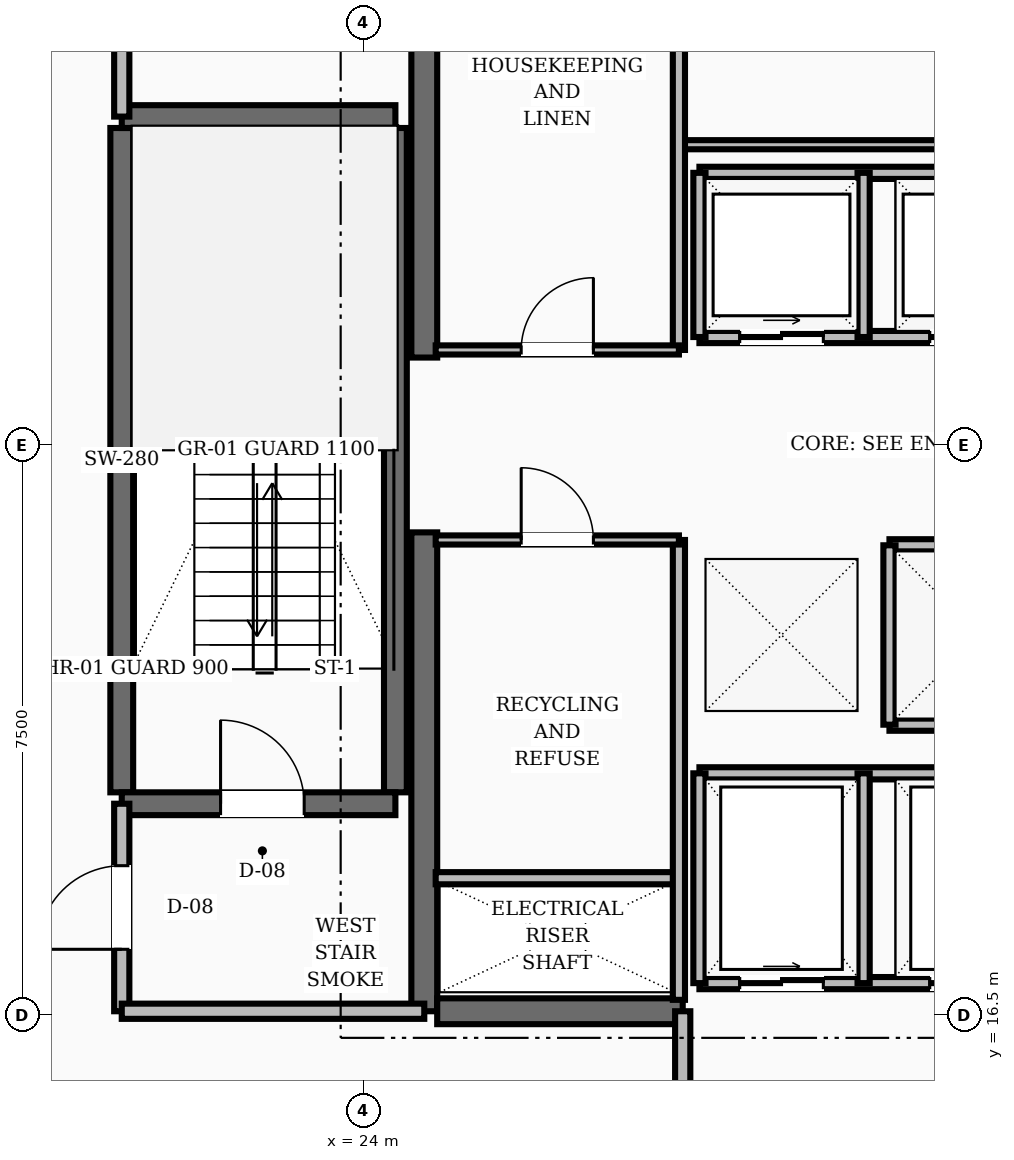
"""IFC4 building model, lengths in metres.
Left out: names, types, materials, properties, quantities, classifications, styles, units other than length and angle.
Written with IfcOpenShell. Run it as: python <this file> out.ifc"""

import sys

from ifc_helpers import new_model, si_unit, direction, frame, frame_2d, origin, place, context, subcontext, project, spatial, rectangle, extrude, element, fill, save


model = new_model("IFC4")
c1 = context("Model", 3, precision=1e-05, world=origin(), true_north=direction((0.0, 1.0)))
c2 = subcontext(c1, "Body", "Model", "MODEL_VIEW")
j1 = project(units=[si_unit("LENGTHUNIT", "METRE"), si_unit("PLANEANGLEUNIT", "RADIAN")], contexts=[c1])
p1 = place(None, origin())
s1 = spatial("IfcSite", under=j1, at=p1, CompositionType="ELEMENT")
p2 = place(p1, origin())
s2 = spatial("IfcBuilding", under=s1, at=p2, CompositionType="ELEMENT")
p3 = place(p2, frame((0.0, 0.0, 167.6)))
s3 = spatial("IfcBuildingStorey", under=s2, at=p3, CompositionType="ELEMENT", Elevation=167.6)
for number, where, z_axis, x_axis in (
    (1, (24.8, 16.55, 0.0), (0.0, 0.0, 1.0), (0.0, 1.0, 0.0)),
    (2, (24.8, 25.15, 0.0), (0.0, 0.0, 1.0), (0.0, 1.0, 0.0)),
):
    element("IfcWall", number, at=place(p3, frame(where, z_axis=z_axis, x_axis=x_axis)), inside=s3, PredefinedType="SHEAR", context=c2, shape_type="SweptSolid", body=[
        extrude(rectangle(XDim=6.3, YDim=0.34, at=frame_2d((3.15, 0.0))), origin(), (0.0, 0.0, 1.0), 3.6),
    ])
p4 = place(p3, frame((24.97, 16.55, 0.0), z_axis=(0.0, 0.0, 1.0), x_axis=(1.0, 0.0, 0.0)))
e3 = element("IfcWall", 3, at=p4, inside=s3, PredefinedType="SHEAR", context=c2, shape_type="SweptSolid", body=[
    extrude(rectangle(XDim=3.23, YDim=0.34, at=frame_2d((1.615, 0.0))), origin(), (0.0, 0.0, 1.0), 3.6),
])
for number, where, z_axis, x_axis in (
    (4, (20.82, 19.43, 0.0), (0.0, 0.0, 1.0), (0.0, 1.0, 0.0)),
    (5, (24.42, 19.43, 0.0), (0.0, 0.0, 1.0), (0.0, 1.0, 0.0)),
):
    element("IfcWall", number, at=place(p3, frame(where, z_axis=z_axis, x_axis=x_axis)), inside=s3, PredefinedType="SHEAR", context=c2, shape_type="SweptSolid", body=[
        extrude(rectangle(XDim=8.74, YDim=0.3, at=frame_2d((4.37, 0.0))), origin(), (0.0, 0.0, 1.0), 3.6),
    ])
p5 = place(p3, frame((20.82, 19.28, 0.0), z_axis=(0.0, 0.0, 1.0), x_axis=(1.0, 0.0, 0.0)))
e6 = element("IfcWall", 6, at=p5, inside=s3, PredefinedType="SHEAR", context=c2, shape_type="SweptSolid", body=[
    extrude(rectangle(XDim=3.6, YDim=0.3, at=frame_2d((1.8, 0.0))), origin(), (0.0, 0.0, 1.0), 3.6),
])
p6 = place(p5, frame((1.3, 0.0, 0.0)))
e7 = element("IfcOpeningElement", 7, at=p6, cuts=e6, PredefinedType="OPENING", context=c2, shape_type="SweptSolid", body=[
    extrude(rectangle(XDim=1.1, YDim=2.1, at=frame_2d((0.55, 1.05))), frame((0.0, 0.16, 0.0), z_axis=(0.0, -1.0, 0.0), x_axis=(1.0, 0.0, 0.0)), (0.0, 0.0, 1.0), 0.32),
])
p7 = place(p3, frame((20.82, 28.32, 0.0), z_axis=(0.0, 0.0, 1.0), x_axis=(1.0, 0.0, 0.0)))
e8 = element("IfcWall", 8, at=p7, inside=s3, PredefinedType="SHEAR", context=c2, shape_type="SweptSolid", body=[
    extrude(rectangle(XDim=3.6, YDim=0.3, at=frame_2d((1.8, 0.0))), origin(), (0.0, 0.0, 1.0), 3.6),
])
p8 = place(p3, frame((20.82, 16.55, 0.0), z_axis=(0.0, 0.0, 1.0), x_axis=(0.0, 1.0, 0.0)))
e9 = element("IfcWall", 9, at=p8, inside=s3, PredefinedType="SOLIDWALL", context=c2, shape_type="SweptSolid", body=[
    extrude(rectangle(XDim=2.73, YDim=0.2, at=frame_2d((1.365, 0.0))), origin(), (0.0, 0.0, 1.0), 2.8),
])
p9 = place(p8, frame((0.815, 0.0, 0.0)))
e10 = element("IfcOpeningElement", 10, at=p9, cuts=e9, PredefinedType="OPENING", context=c2, shape_type="SweptSolid", body=[
    extrude(rectangle(XDim=1.1, YDim=2.1, at=frame_2d((0.55, 1.05))), frame((0.0, 0.11, 0.0), z_axis=(0.0, -1.0, 0.0), x_axis=(1.0, 0.0, 0.0)), (0.0, 0.0, 1.0), 0.22),
])
p10 = place(p3, frame((20.82, 16.55, 0.0), z_axis=(0.0, 0.0, 1.0), x_axis=(1.0, 0.0, 0.0)))
e11 = element("IfcWall", 11, at=p10, inside=s3, PredefinedType="SOLIDWALL", context=c2, shape_type="SweptSolid", body=[
    extrude(rectangle(XDim=3.98, YDim=0.2, at=frame_2d((1.99, 0.0))), origin(), (0.0, 0.0, 1.0), 2.8),
])
p11 = place(p3, frame((20.82, 28.32, 0.0), z_axis=(0.0, 0.0, 1.0), x_axis=(0.0, 1.0, 0.0)))
e12 = element("IfcWall", 12, at=p11, inside=s3, PredefinedType="SOLIDWALL", context=c2, shape_type="SweptSolid", body=[
    extrude(rectangle(XDim=3.13, YDim=0.2, at=frame_2d((1.565, 0.0))), origin(), (0.0, 0.0, 1.0), 2.8),
])
p12 = place(p11, frame((1.09, 0.0, 0.0)))
e13 = element("IfcOpeningElement", 13, at=p12, cuts=e12, PredefinedType="OPENING", context=c2, shape_type="SweptSolid", body=[
    extrude(rectangle(XDim=0.95, YDim=2.1, at=frame_2d((0.475, 1.05))), frame((0.0, 0.11, 0.0), z_axis=(0.0, -1.0, 0.0), x_axis=(1.0, 0.0, 0.0)), (0.0, 0.0, 1.0), 0.22),
])
p13 = place(p3, frame((28.2, 14.35, 0.0), z_axis=(0.0, 0.0, 1.0), x_axis=(0.0, 1.0, 0.0)))
e14 = element("IfcWall", 14, at=p13, inside=s3, PredefinedType="SOLIDWALL", context=c2, shape_type="SweptSolid", body=[
    extrude(rectangle(XDim=2.2, YDim=0.2, at=frame_2d((1.1, 0.0))), origin(), (0.0, 0.0, 1.0), 2.8),
])
p14 = place(p3, frame((28.42, 25.42, 0.0), z_axis=(0.0, 0.0, 1.0), x_axis=(1.0, 0.0, 0.0)))
e15 = element("IfcWall", 15, at=p14, inside=s3, PredefinedType="SOLIDWALL", context=c2, shape_type="SweptSolid", body=[
    extrude(rectangle(XDim=4.66, YDim=0.16, at=frame_2d((2.33, 0.0))), origin(), (0.0, 0.0, 1.0), 2.8),
])
p15 = place(p14, frame((0.53, 0.0, 0.0)))
e16 = element("IfcOpeningElement", 16, at=p15, cuts=e15, PredefinedType="OPENING", context=c2, shape_type="SweptSolid", body=[
    extrude(rectangle(XDim=1.1, YDim=2.15, at=frame_2d((0.55, 1.075))), frame((0.0, 0.09, 0.0), z_axis=(0.0, -1.0, 0.0), x_axis=(1.0, 0.0, 0.0)), (0.0, 0.0, 1.0), 0.18),
])
p16 = place(p14, frame((3.03, 0.0, 0.0)))
e17 = element("IfcOpeningElement", 17, at=p16, cuts=e15, PredefinedType="OPENING", context=c2, shape_type="SweptSolid", body=[
    extrude(rectangle(XDim=1.1, YDim=2.15, at=frame_2d((0.55, 1.075))), frame((0.0, 0.09, 0.0), z_axis=(0.0, -1.0, 0.0), x_axis=(1.0, 0.0, 0.0)), (0.0, 0.0, 1.0), 0.18),
])
p17 = place(p3, frame((28.42, 27.58, 0.0), z_axis=(0.0, 0.0, 1.0), x_axis=(1.0, 0.0, 0.0)))
e18 = element("IfcWall", 18, at=p17, inside=s3, PredefinedType="SOLIDWALL", context=c2, shape_type="SweptSolid", body=[
    extrude(rectangle(XDim=4.66, YDim=0.16, at=frame_2d((2.33, 0.0))), origin(), (0.0, 0.0, 1.0), 2.8),
])
for number, where, z_axis, x_axis in (
    (19, (28.42, 25.42, 0.0), (0.0, 0.0, 1.0), (0.0, 1.0, 0.0)),
    (20, (30.58, 25.42, 0.0), (0.0, 0.0, 1.0), (0.0, 1.0, 0.0)),
):
    element("IfcWall", number, at=place(p3, frame(where, z_axis=z_axis, x_axis=x_axis)), inside=s3, PredefinedType="SOLIDWALL", context=c2, shape_type="SweptSolid", body=[
        extrude(rectangle(XDim=2.16, YDim=0.16, at=frame_2d((1.08, 0.0))), origin(), (0.0, 0.0, 1.0), 2.8),
    ])
for number, where, z_axis, x_axis in (
    (21, (30.92, 22.68, 0.0), (0.0, 0.0, 1.0), (1.0, 0.0, 0.0)),
    (22, (30.92, 20.32, 0.0), (0.0, 0.0, 1.0), (1.0, 0.0, 0.0)),
):
    element("IfcWall", number, at=place(p3, frame(where, z_axis=z_axis, x_axis=x_axis)), inside=s3, PredefinedType="SOLIDWALL", context=c2, shape_type="SweptSolid", body=[
        extrude(rectangle(XDim=4.76, YDim=0.16, at=frame_2d((2.38, 0.0))), origin(), (0.0, 0.0, 1.0), 2.8),
    ])
p18 = place(p3, frame((30.92, 20.32, 0.0), z_axis=(0.0, 0.0, 1.0), x_axis=(0.0, 1.0, 0.0)))
e23 = element("IfcWall", 23, at=p18, inside=s3, PredefinedType="SOLIDWALL", context=c2, shape_type="SweptSolid", body=[
    extrude(rectangle(XDim=2.36, YDim=0.16, at=frame_2d((1.18, 0.0))), origin(), (0.0, 0.0, 1.0), 2.8),
])
p19 = place(p3, frame((28.42, 16.92, 0.0), z_axis=(0.0, 0.0, 1.0), x_axis=(1.0, 0.0, 0.0)))
e24 = element("IfcWall", 24, at=p19, inside=s3, PredefinedType="SOLIDWALL", context=c2, shape_type="SweptSolid", body=[
    extrude(rectangle(XDim=7.16, YDim=0.16, at=frame_2d((3.58, 0.0))), origin(), (0.0, 0.0, 1.0), 2.8),
])
p20 = place(p19, frame((0.53, 0.0, 0.0)))
e25 = element("IfcOpeningElement", 25, at=p20, cuts=e24, PredefinedType="OPENING", context=c2, shape_type="SweptSolid", body=[
    extrude(rectangle(XDim=1.1, YDim=2.15, at=frame_2d((0.55, 1.075))), frame((0.0, 0.09, 0.0), z_axis=(0.0, -1.0, 0.0), x_axis=(1.0, 0.0, 0.0)), (0.0, 0.0, 1.0), 0.18),
])
p21 = place(p19, frame((3.03, 0.0, 0.0)))
e26 = element("IfcOpeningElement", 26, at=p21, cuts=e24, PredefinedType="OPENING", context=c2, shape_type="SweptSolid", body=[
    extrude(rectangle(XDim=1.1, YDim=2.15, at=frame_2d((0.55, 1.075))), frame((0.0, 0.09, 0.0), z_axis=(0.0, -1.0, 0.0), x_axis=(1.0, 0.0, 0.0)), (0.0, 0.0, 1.0), 0.18),
])
p22 = place(p19, frame((5.53, 0.0, 0.0)))
e27 = element("IfcOpeningElement", 27, at=p22, cuts=e24, PredefinedType="OPENING", context=c2, shape_type="SweptSolid", body=[
    extrude(rectangle(XDim=1.1, YDim=2.15, at=frame_2d((0.55, 1.075))), frame((0.0, 0.09, 0.0), z_axis=(0.0, -1.0, 0.0), x_axis=(1.0, 0.0, 0.0)), (0.0, 0.0, 1.0), 0.18),
])
p23 = place(p3, frame((28.42, 19.68, 0.0), z_axis=(0.0, 0.0, 1.0), x_axis=(1.0, 0.0, 0.0)))
e28 = element("IfcWall", 28, at=p23, inside=s3, PredefinedType="SOLIDWALL", context=c2, shape_type="SweptSolid", body=[
    extrude(rectangle(XDim=7.16, YDim=0.16, at=frame_2d((3.58, 0.0))), origin(), (0.0, 0.0, 1.0), 2.8),
])
for number, where, z_axis, x_axis in (
    (29, (28.42, 16.92, 0.0), (0.0, 0.0, 1.0), (0.0, 1.0, 0.0)),
    (30, (30.58, 16.92, 0.0), (0.0, 0.0, 1.0), (0.0, 1.0, 0.0)),
):
    element("IfcWall", number, at=place(p3, frame(where, z_axis=z_axis, x_axis=x_axis)), inside=s3, PredefinedType="SOLIDWALL", context=c2, shape_type="SweptSolid", body=[
        extrude(rectangle(XDim=2.76, YDim=0.16, at=frame_2d((1.38, 0.0))), origin(), (0.0, 0.0, 1.0), 2.8),
    ])
p24 = place(p3, frame((28.2, 27.95, 0.0), z_axis=(0.0, 0.0, 1.0), x_axis=(1.0, 0.0, 0.0)))
e31 = element("IfcWall", 31, at=p24, inside=s3, PredefinedType="PARTITIONING", context=c2, shape_type="SweptSolid", body=[
    extrude(rectangle(XDim=7.6, YDim=0.12, at=frame_2d((3.8, 0.0))), origin(), (0.0, 0.0, 1.0), 2.8),
])
p25 = place(p3, frame((24.95, 18.3, 0.0), z_axis=(0.0, 0.0, 1.0), x_axis=(1.0, 0.0, 0.0)))
e32 = element("IfcWall", 32, at=p25, inside=s3, PredefinedType="SOLIDWALL", context=c2, shape_type="SweptSolid", body=[
    extrude(rectangle(XDim=3.2, YDim=0.16, at=frame_2d((1.6, 0.0))), origin(), (0.0, 0.0, 1.0), 2.8),
])
p26 = place(p3, frame((28.15, 16.7, 0.0), z_axis=(0.0, 0.0, 1.0), x_axis=(0.0, 1.0, 0.0)))
e33 = element("IfcWall", 33, at=p26, inside=s3, PredefinedType="SOLIDWALL", context=c2, shape_type="SweptSolid", body=[
    extrude(rectangle(XDim=6.05, YDim=0.16, at=frame_2d((3.025, 0.0))), origin(), (0.0, 0.0, 1.0), 2.8),
])
p27 = place(p3, frame((28.15, 25.25, 0.0), z_axis=(0.0, 0.0, 1.0), x_axis=(0.0, 1.0, 0.0)))
e34 = element("IfcWall", 34, at=p27, inside=s3, PredefinedType="SOLIDWALL", context=c2, shape_type="SweptSolid", body=[
    extrude(rectangle(XDim=6.1, YDim=0.16, at=frame_2d((3.05, 0.0))), origin(), (0.0, 0.0, 1.0), 2.8),
])
p28 = place(p3, frame((24.95, 25.25, 0.0), z_axis=(0.0, 0.0, 1.0), x_axis=(1.0, 0.0, 0.0)))
e35 = element("IfcWall", 35, at=p28, inside=s3, PredefinedType="PARTITIONING", context=c2, shape_type="SweptSolid", body=[
    extrude(rectangle(XDim=3.2, YDim=0.12, at=frame_2d((1.6, 0.0))), origin(), (0.0, 0.0, 1.0), 2.8),
])
p29 = place(p28, frame((1.125, 0.0, 0.0)))
e36 = element("IfcOpeningElement", 36, at=p29, cuts=e35, PredefinedType="OPENING", context=c2, shape_type="SweptSolid", body=[
    extrude(rectangle(XDim=0.95, YDim=2.1, at=frame_2d((0.475, 1.05))), frame((0.0, 0.07, 0.0), z_axis=(0.0, -1.0, 0.0), x_axis=(1.0, 0.0, 0.0)), (0.0, 0.0, 1.0), 0.14),
])
p30 = place(p3, frame((24.95, 22.75, 0.0), z_axis=(0.0, 0.0, 1.0), x_axis=(1.0, 0.0, 0.0)))
e37 = element("IfcWall", 37, at=p30, inside=s3, PredefinedType="PARTITIONING", context=c2, shape_type="SweptSolid", body=[
    extrude(rectangle(XDim=3.2, YDim=0.12, at=frame_2d((1.6, 0.0))), origin(), (0.0, 0.0, 1.0), 2.8),
])
p31 = place(p30, frame((1.125, 0.0, 0.0)))
e38 = element("IfcOpeningElement", 38, at=p31, cuts=e37, PredefinedType="OPENING", context=c2, shape_type="SweptSolid", body=[
    extrude(rectangle(XDim=0.95, YDim=2.1, at=frame_2d((0.475, 1.05))), frame((0.0, 0.07, 0.0), z_axis=(0.0, -1.0, 0.0), x_axis=(1.0, 0.0, 0.0)), (0.0, 0.0, 1.0), 0.14),
])
p32 = place(p6, origin())
e39 = element("IfcDoor", 39, at=p32, inside=s3, OperationType="SINGLE_SWING_LEFT", PredefinedType="DOOR", context=c2, shape_type="SweptSolid", body=[
    extrude(rectangle(XDim=1.1, YDim=2.1, at=frame_2d((0.55, 1.05))), frame((0.0, 0.025, 0.0), z_axis=(0.0, -1.0, 0.0), x_axis=(1.0, 0.0, 0.0)), (0.0, 0.0, 1.0), 0.05),
])
fill(e7, e39)
p33 = place(p9, origin())
e40 = element("IfcDoor", 40, at=p33, inside=s3, OperationType="SINGLE_SWING_LEFT", PredefinedType="DOOR", context=c2, shape_type="SweptSolid", body=[
    extrude(rectangle(XDim=1.1, YDim=2.1, at=frame_2d((0.55, 1.05))), frame((0.0, 0.025, 0.0), z_axis=(0.0, -1.0, 0.0), x_axis=(1.0, 0.0, 0.0)), (0.0, 0.0, 1.0), 0.05),
])
fill(e10, e40)
p34 = place(p15, origin())
e41 = element("IfcDoor", 41, at=p34, inside=s3, OperationType="SLIDING_TO_RIGHT", PredefinedType="DOOR", context=c2, shape_type="SweptSolid", body=[
    extrude(rectangle(XDim=1.1, YDim=2.15, at=frame_2d((0.55, 1.075))), frame((0.0, 0.025, 0.0), z_axis=(0.0, -1.0, 0.0), x_axis=(1.0, 0.0, 0.0)), (0.0, 0.0, 1.0), 0.05),
])
fill(e16, e41)
p35 = place(p16, origin())
e42 = element("IfcDoor", 42, at=p35, inside=s3, OperationType="SLIDING_TO_RIGHT", PredefinedType="DOOR", context=c2, shape_type="SweptSolid", body=[
    extrude(rectangle(XDim=1.1, YDim=2.15, at=frame_2d((0.55, 1.075))), frame((0.0, 0.025, 0.0), z_axis=(0.0, -1.0, 0.0), x_axis=(1.0, 0.0, 0.0)), (0.0, 0.0, 1.0), 0.05),
])
fill(e17, e42)
p36 = place(p20, origin())
e43 = element("IfcDoor", 43, at=p36, inside=s3, OperationType="SLIDING_TO_RIGHT", PredefinedType="DOOR", context=c2, shape_type="SweptSolid", body=[
    extrude(rectangle(XDim=1.1, YDim=2.15, at=frame_2d((0.55, 1.075))), frame((0.0, 0.025, 0.0), z_axis=(0.0, -1.0, 0.0), x_axis=(1.0, 0.0, 0.0)), (0.0, 0.0, 1.0), 0.05),
])
fill(e25, e43)
p37 = place(p21, origin())
e44 = element("IfcDoor", 44, at=p37, inside=s3, OperationType="SLIDING_TO_RIGHT", PredefinedType="DOOR", context=c2, shape_type="SweptSolid", body=[
    extrude(rectangle(XDim=1.1, YDim=2.15, at=frame_2d((0.55, 1.075))), frame((0.0, 0.025, 0.0), z_axis=(0.0, -1.0, 0.0), x_axis=(1.0, 0.0, 0.0)), (0.0, 0.0, 1.0), 0.05),
])
fill(e26, e44)
p38 = place(p29, origin())
e45 = element("IfcDoor", 45, at=p38, inside=s3, OperationType="SINGLE_SWING_RIGHT", PredefinedType="DOOR", context=c2, shape_type="SweptSolid", body=[
    extrude(rectangle(XDim=0.95, YDim=2.1, at=frame_2d((0.475, 1.05))), frame((0.0, 0.025, 0.0), z_axis=(0.0, -1.0, 0.0), x_axis=(1.0, 0.0, 0.0)), (0.0, 0.0, 1.0), 0.05),
])
fill(e36, e45)
p39 = place(p31, origin())
e46 = element("IfcDoor", 46, at=p39, inside=s3, OperationType="SINGLE_SWING_LEFT", PredefinedType="DOOR", context=c2, shape_type="SweptSolid", body=[
    extrude(rectangle(XDim=0.95, YDim=2.1, at=frame_2d((0.475, 1.05))), frame((0.0, 0.025, 0.0), z_axis=(0.0, -1.0, 0.0), x_axis=(1.0, 0.0, 0.0)), (0.0, 0.0, 1.0), 0.05),
])
fill(e38, e46)
save(model, sys.argv[1])
